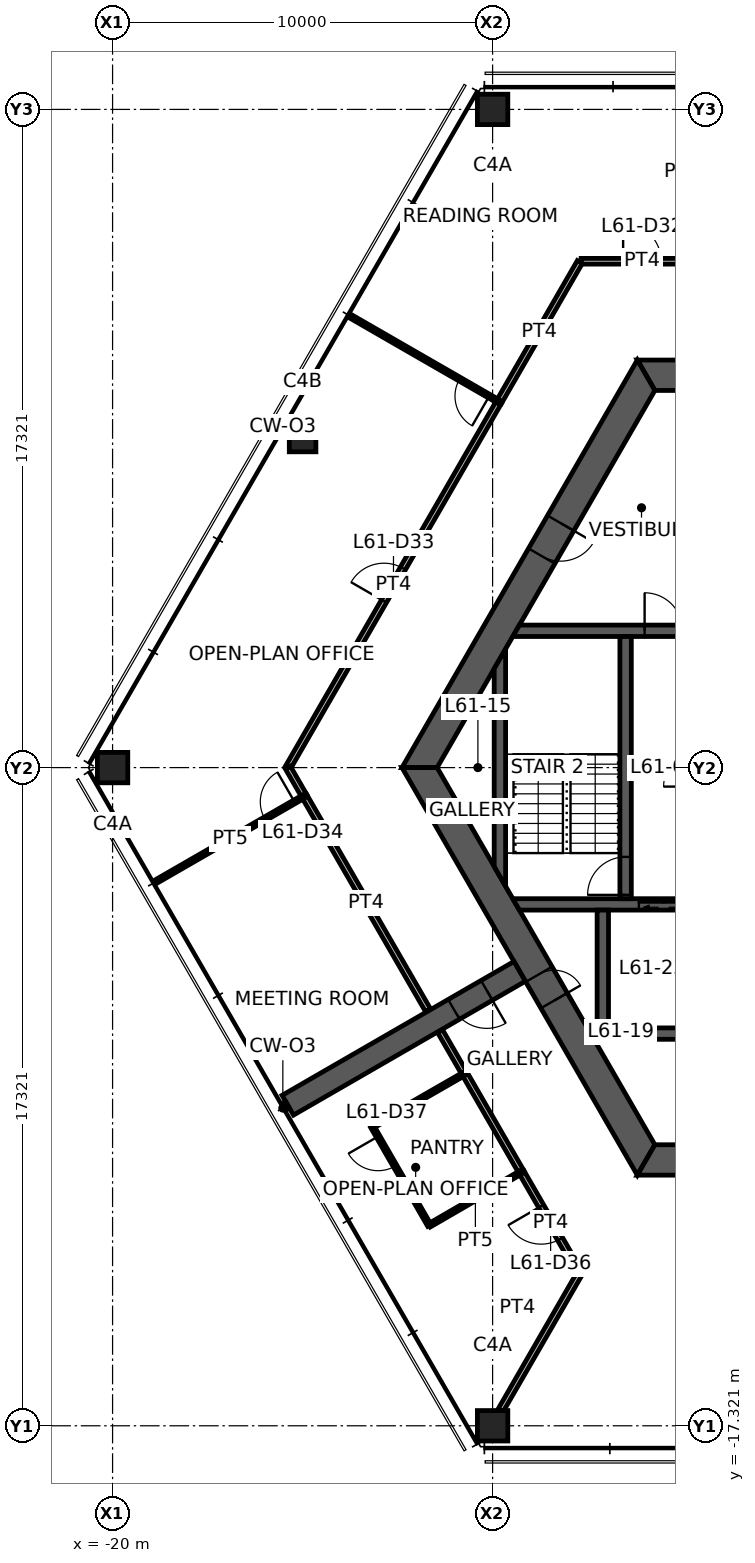
"""IFC4 building model, lengths in metres.
Left out: names, types, materials, properties, quantities, classifications, styles, units other than length and angle.
Written with IfcOpenShell. Run it as: python <this file> out.ifc"""

import sys

from ifc_helpers import new_model, si_unit, direction, frame, frame_2d, origin, origin_2d, place, context, subcontext, project, spatial, polyline, rectangle, hollow_rectangle, outline, extrude, element, fill, save


model = new_model("IFC4")
c1 = context("Model", 3, precision=1e-05, world=origin(), true_north=direction((0.0, 1.0)))
c2 = subcontext(c1, "Body", "Model", "MODEL_VIEW")
j1 = project(units=[si_unit("LENGTHUNIT", "METRE"), si_unit("PLANEANGLEUNIT", "RADIAN")], contexts=[c1])
p1 = place(None, origin())
s1 = spatial("IfcSite", under=j1, at=p1, CompositionType="ELEMENT")
p2 = place(p1, origin())
s2 = spatial("IfcBuilding", under=s1, at=p2, CompositionType="ELEMENT")
p3 = place(p2, frame((0.0, 0.0, 244.0)))
s3 = spatial("IfcBuildingStorey", under=s2, at=p3, CompositionType="ELEMENT", Elevation=244.0)
for number, where, z_axis, x_axis in (
    (1, (-10.0, 17.321, 0.0), (0.0, 0.0, 1.0), (1.0, 0.0, 0.0)),
    (2, (-20.0, 0.0, 0.0), (0.0, 0.0, 1.0), (1.0, 0.0, 0.0)),
    (3, (-10.0, -17.321, 0.0), (0.0, 0.0, 1.0), (1.0, 0.0, 0.0)),
):
    element("IfcColumn", number, at=place(p3, frame(where, z_axis=z_axis, x_axis=x_axis)), inside=s3, PredefinedType="COLUMN", context=c2, shape_type="SweptSolid", body=[
        extrude(hollow_rectangle(XDim=0.8, YDim=0.8, WallThickness=0.04, at=origin_2d()), origin(), (0.0, 0.0, 1.0), 3.9),
    ])
p4 = place(p3, frame((-15.0, 8.66, 0.0), z_axis=(0.0, 0.0, 1.0), x_axis=(1.0, 0.0, 0.0)))
e4 = element("IfcColumn", 4, at=p4, inside=s3, PredefinedType="COLUMN", context=c2, shape_type="SweptSolid", body=[
    extrude(hollow_rectangle(XDim=0.7, YDim=0.7, WallThickness=0.032, at=origin_2d()), origin(), (0.0, 0.0, 1.0), 3.9),
])
p5 = place(p3, frame((5.961, 10.325, 0.0), z_axis=(0.0, 0.0, 1.0), x_axis=(-1.0, 0.0, 0.0)))
e5 = element("IfcWall", 5, at=p5, inside=s3, PredefinedType="SHEAR", context=c2, shape_type="SweptSolid", body=[
    extrude(outline(polyline([(-0.231, -0.4), (4.636, -0.4), (5.536, -0.4), (6.386, -0.4), (7.286, -0.4), (12.153, -0.4), (11.691, 0.4), (7.286, 0.4), (6.386, 0.4), (5.536, 0.4), (4.636, 0.4), (0.231, 0.4), (-0.231, -0.4)])), origin(), (0.0, 0.0, 1.0), 3.9),
])
p6 = place(p5, frame((6.386, 0.0, 0.0)))
e6 = element("IfcOpeningElement", 6, at=p6, cuts=e5, PredefinedType="OPENING", context=c2, shape_type="SweptSolid", body=[
    extrude(rectangle(XDim=0.9, YDim=2.1, at=frame_2d((0.45, 1.05))), frame((0.0, 0.41, 0.0), z_axis=(0.0, -1.0, 0.0), x_axis=(1.0, 0.0, 0.0)), (0.0, 0.0, 1.0), 0.82),
])
p7 = place(p5, frame((4.636, 0.0, 0.0)))
e7 = element("IfcOpeningElement", 7, at=p7, cuts=e5, PredefinedType="OPENING", context=c2, shape_type="SweptSolid", body=[
    extrude(rectangle(XDim=0.9, YDim=2.1, at=frame_2d((0.45, 1.05))), frame((0.0, 0.41, 0.0), z_axis=(0.0, -1.0, 0.0), x_axis=(1.0, 0.0, 0.0)), (0.0, 0.0, 1.0), 0.82),
])
p8 = place(p3, frame((-5.961, 10.325, 0.0), z_axis=(0.0, 0.0, 1.0), x_axis=(-0.500004296715, -0.866022923061, 0.0)))
e8 = element("IfcWall", 8, at=p8, inside=s3, PredefinedType="SHEAR", context=c2, shape_type="SweptSolid", body=[
    extrude(outline(polyline([(-0.231, -0.4), (4.494, -0.4), (5.494, -0.4), (12.153, -0.4), (11.691, 0.4), (5.494, 0.4), (4.494, 0.4), (0.231, 0.4), (-0.231, -0.4)])), origin(), (0.0, 0.0, 1.0), 3.9),
])
p9 = place(p8, frame((4.494, 0.0, 0.0)))
e9 = element("IfcOpeningElement", 9, at=p9, cuts=e8, PredefinedType="OPENING", context=c2, shape_type="SweptSolid", body=[
    extrude(rectangle(XDim=1.0, YDim=2.1, at=frame_2d((0.5, 1.05))), frame((0.0, 0.41, 0.0), z_axis=(0.0, -1.0, 0.0), x_axis=(1.0, 0.0, 0.0)), (0.0, 0.0, 1.0), 0.82),
])
p10 = place(p3, frame((-11.922, 0.0, 0.0), z_axis=(0.0, 0.0, 1.0), x_axis=(0.500004296715, -0.866022923061, 0.0)))
e10 = element("IfcWall", 10, at=p10, inside=s3, PredefinedType="SHEAR", context=c2, shape_type="SweptSolid", body=[
    extrude(outline(polyline([(-0.231, -0.4), (6.281, -0.4), (7.081, -0.4), (12.153, -0.4), (11.691, 0.4), (7.081, 0.4), (6.281, 0.4), (0.231, 0.4), (-0.231, -0.4)])), origin(), (0.0, 0.0, 1.0), 3.9),
])
p11 = place(p10, frame((6.281, 0.0, 0.0)))
e11 = element("IfcOpeningElement", 11, at=p11, cuts=e10, PredefinedType="OPENING", context=c2, shape_type="SweptSolid", body=[
    extrude(rectangle(XDim=0.8, YDim=2.1, at=frame_2d((0.4, 1.05))), frame((0.0, 0.41, 0.0), z_axis=(0.0, -1.0, 0.0), x_axis=(1.0, 0.0, 0.0)), (0.0, 0.0, 1.0), 0.82),
])
p12 = place(p3, frame((-5.961, -10.325, 0.0), z_axis=(0.0, 0.0, 1.0), x_axis=(1.0, 0.0, 0.0)))
e12 = element("IfcWall", 12, at=p12, inside=s3, PredefinedType="SHEAR", context=c2, shape_type="SweptSolid", body=[
    extrude(outline(polyline([(-0.231, -0.4), (5.461, -0.4), (6.461, -0.4), (12.153, -0.4), (11.691, 0.4), (6.461, 0.4), (5.461, 0.4), (0.231, 0.4), (-0.231, -0.4)])), origin(), (0.0, 0.0, 1.0), 3.9),
])
p13 = place(p12, frame((5.461, 0.0, 0.0)))
e13 = element("IfcOpeningElement", 13, at=p13, cuts=e12, PredefinedType="OPENING", context=c2, shape_type="SweptSolid", body=[
    extrude(rectangle(XDim=1.0, YDim=2.1, at=frame_2d((0.5, 1.05))), frame((0.0, 0.41, 0.0), z_axis=(0.0, -1.0, 0.0), x_axis=(1.0, 0.0, 0.0)), (0.0, 0.0, 1.0), 0.82),
])
p14 = place(p3, frame((-9.288, -5.363, 0.0), z_axis=(0.0, 0.0, 1.0), x_axis=(-0.866027473358, -0.499996415376, 0.0)))
e14 = element("IfcWall", 14, at=p14, inside=s3, PredefinedType="SHEAR", context=c2, shape_type="SweptSolid", body=[
    extrude(rectangle(XDim=7.045, YDim=0.6, at=frame_2d((3.523, 0.0))), origin(), (0.0, 0.0, 1.0), 3.9),
])
p15 = place(p14, frame((1.0, 0.0, 0.0)))
e15 = element("IfcOpeningElement", 15, at=p15, cuts=e14, PredefinedType="OPENING", context=c2, shape_type="SweptSolid", body=[
    extrude(rectangle(XDim=1.0, YDim=2.1, at=frame_2d((0.5, 1.05))), frame((0.0, 0.31, 0.0), z_axis=(0.0, -1.0, 0.0), x_axis=(1.0, 0.0, 0.0)), (0.0, 0.0, 1.0), 0.62),
])
p16 = place(p3, frame((-9.382, 3.6, 0.0), z_axis=(0.0, 0.0, 1.0), x_axis=(1.0, 0.0, 0.0)))
e16 = element("IfcWall", 16, at=p16, inside=s3, PredefinedType="SHEAR", context=c2, shape_type="SweptSolid", body=[
    extrude(outline(polyline([(-0.087, -0.15), (3.382, -0.15), (4.382, -0.15), (5.782, -0.15), (6.882, -0.15), (7.932, -0.15), (7.932, 0.15), (6.882, 0.15), (5.782, 0.15), (4.382, 0.15), (3.382, 0.15), (0.087, 0.15), (-0.087, -0.15)])), origin(), (0.0, 0.0, 1.0), 3.9),
])
p17 = place(p16, frame((3.382, 0.0, 0.0)))
e17 = element("IfcOpeningElement", 17, at=p17, cuts=e16, PredefinedType="OPENING", context=c2, shape_type="SweptSolid", body=[
    extrude(rectangle(XDim=1.0, YDim=2.1, at=frame_2d((0.5, 1.05))), frame((0.0, 0.16, 0.0), z_axis=(0.0, -1.0, 0.0), x_axis=(1.0, 0.0, 0.0)), (0.0, 0.0, 1.0), 0.32),
])
p18 = place(p16, frame((5.782, 0.0, 0.0)))
e18 = element("IfcOpeningElement", 18, at=p18, cuts=e16, PredefinedType="OPENING", context=c2, shape_type="SweptSolid", body=[
    extrude(rectangle(XDim=1.1, YDim=2.1, at=frame_2d((0.55, 1.05))), frame((0.0, 0.16, 0.0), z_axis=(0.0, -1.0, 0.0), x_axis=(1.0, 0.0, 0.0)), (0.0, 0.0, 1.0), 0.32),
])
p19 = place(p3, frame((-9.382, -3.6, 0.0), z_axis=(0.0, 0.0, 1.0), x_axis=(1.0, 0.0, 0.0)))
e19 = element("IfcWall", 19, at=p19, inside=s3, PredefinedType="SHEAR", context=c2, shape_type="SweptSolid", body=[
    extrude(outline(polyline([(0.087, -0.15), (3.232, -0.15), (4.532, -0.15), (5.782, -0.15), (6.882, -0.15), (7.932, -0.15), (7.932, 0.15), (6.882, 0.15), (5.782, 0.15), (4.532, 0.15), (3.232, 0.15), (-0.087, 0.15), (0.087, -0.15)])), origin(), (0.0, 0.0, 1.0), 3.9),
])
p20 = place(p19, frame((5.782, 0.0, 0.0)))
e20 = element("IfcOpeningElement", 20, at=p20, cuts=e19, PredefinedType="OPENING", context=c2, shape_type="SweptSolid", body=[
    extrude(rectangle(XDim=1.1, YDim=2.1, at=frame_2d((0.55, 1.05))), frame((0.0, 0.16, 0.0), z_axis=(0.0, -1.0, 0.0), x_axis=(1.0, 0.0, 0.0)), (0.0, 0.0, 1.0), 0.32),
])
p21 = place(p19, frame((3.232, 0.0, 0.0)))
e21 = element("IfcOpeningElement", 21, at=p21, cuts=e19, PredefinedType="OPENING", context=c2, shape_type="SweptSolid", body=[
    extrude(rectangle(XDim=1.3, YDim=2.1, at=frame_2d((0.65, 1.05))), frame((0.0, 0.16, 0.0), z_axis=(0.0, -1.0, 0.0), x_axis=(1.0, 0.0, 0.0)), (0.0, 0.0, 1.0), 0.32),
])
p22 = place(p3, frame((-6.5, -3.45, 0.0), z_axis=(0.0, 0.0, 1.0), x_axis=(0.0, 1.0, 0.0)))
e22 = element("IfcWall", 22, at=p22, inside=s3, PredefinedType="SHEAR", context=c2, shape_type="SweptSolid", body=[
    extrude(rectangle(XDim=6.9, YDim=0.3, at=frame_2d((3.45, 0.0))), origin(), (0.0, 0.0, 1.0), 3.9),
])
p23 = place(p22, frame((0.1, 0.0, 0.0)))
e23 = element("IfcOpeningElement", 23, at=p23, cuts=e22, PredefinedType="OPENING", context=c2, shape_type="SweptSolid", body=[
    extrude(rectangle(XDim=1.0, YDim=2.1, at=frame_2d((0.5, 1.05))), frame((0.0, 0.16, 0.0), z_axis=(0.0, -1.0, 0.0), x_axis=(1.0, 0.0, 0.0)), (0.0, 0.0, 1.0), 0.32),
])
p24 = place(p3, frame((-7.25, -7.0, 0.0), z_axis=(0.0, 0.0, 1.0), x_axis=(1.0, 0.0, 0.0)))
e24 = element("IfcWall", 24, at=p24, inside=s3, PredefinedType="SHEAR", context=c2, shape_type="SweptSolid", body=[
    extrude(rectangle(XDim=2.6, YDim=0.3, at=frame_2d((1.3, 0.0))), origin(), (0.0, 0.0, 1.0), 3.9),
])
p25 = place(p3, frame((-7.1, -3.75, 0.0), z_axis=(0.0, 0.0, 1.0), x_axis=(0.0, -1.0, 0.0)))
e25 = element("IfcWall", 25, at=p25, inside=s3, PredefinedType="SHEAR", context=c2, shape_type="SweptSolid", body=[
    extrude(rectangle(XDim=3.1, YDim=0.3, at=frame_2d((1.55, 0.0))), origin(), (0.0, 0.0, 1.0), 3.9),
])
p26 = place(p3, frame((-9.808, -2.862, 0.0), z_axis=(0.0, 0.0, 1.0), x_axis=(0.0, 1.0, 0.0)))
e26 = element("IfcWall", 26, at=p26, inside=s3, PredefinedType="SHEAR", context=c2, shape_type="SweptSolid", body=[
    extrude(outline(polyline([(-0.26, -0.15), (5.984, -0.15), (5.465, 0.15), (0.26, 0.15), (-0.26, -0.15)])), origin(), (0.0, 0.0, 1.0), 3.9),
])
p27 = place(p3, frame((-7.67, 13.325, 0.0), z_axis=(0.0, 0.0, 1.0), x_axis=(1.0, 0.0, 0.0)))
e27 = element("IfcWall", 27, at=p27, inside=s3, PredefinedType="PARTITIONING", context=c2, shape_type="SweptSolid", body=[
    extrude(rectangle(XDim=3.21, YDim=0.15, at=frame_2d((1.605, 0.0))), origin(), (0.0, 0.0, 1.0), 2.95),
])
p28 = place(p27, frame((1.105, 0.0, 0.0)))
e28 = element("IfcOpeningElement", 28, at=p28, cuts=e27, PredefinedType="OPENING", context=c2, shape_type="SweptSolid", body=[
    extrude(rectangle(XDim=1.0, YDim=2.1, at=frame_2d((0.5, 1.05))), frame((0.0, 0.085, 0.0), z_axis=(0.0, -1.0, 0.0), x_axis=(1.0, 0.0, 0.0)), (0.0, 0.0, 1.0), 0.17),
])
p29 = place(p3, frame((-11.7, -6.385, 0.0), z_axis=(0.0, 0.0, 1.0), x_axis=(-0.500003537243, 0.866023361547, 0.0)))
e29 = element("IfcWall", 29, at=p29, inside=s3, PredefinedType="PARTITIONING", context=c2, shape_type="SweptSolid", body=[
    extrude(rectangle(XDim=6.516, YDim=0.15, at=frame_2d((3.258, 0.0))), origin(), (0.0, 0.0, 1.0), 2.95),
])
p30 = place(p3, frame((-9.835, 9.616, 0.0), z_axis=(0.0, 0.0, 1.0), x_axis=(0.500078009402, 0.86598036035, 0.0)))
e30 = element("IfcWall", 30, at=p30, inside=s3, PredefinedType="PARTITIONING", context=c2, shape_type="SweptSolid", body=[
    extrude(rectangle(XDim=4.26, YDim=0.15, at=frame_2d((2.13, 0.0))), origin(), (0.0, 0.0, 1.0), 2.95),
])
p31 = place(p3, frame((-15.386, 0.0, 0.0), z_axis=(0.0, 0.0, 1.0), x_axis=(0.50000453164, 0.866022787425, 0.0)))
e31 = element("IfcWall", 31, at=p31, inside=s3, PredefinedType="PARTITIONING", context=c2, shape_type="SweptSolid", body=[
    extrude(rectangle(XDim=11.113, YDim=0.15, at=frame_2d((5.557, 0.0))), origin(), (0.0, 0.0, 1.0), 2.95),
])
p32 = place(p31, frame((5.057, 0.0, 0.0)))
e32 = element("IfcOpeningElement", 32, at=p32, cuts=e31, PredefinedType="OPENING", context=c2, shape_type="SweptSolid", body=[
    extrude(rectangle(XDim=1.0, YDim=2.1, at=frame_2d((0.5, 1.05))), frame((0.0, 0.085, 0.0), z_axis=(0.0, -1.0, 0.0), x_axis=(1.0, 0.0, 0.0)), (0.0, 0.0, 1.0), 0.17),
])
p33 = place(p3, frame((-14.953, -0.75, 0.0), z_axis=(0.0, 0.0, 1.0), x_axis=(-0.500258826225, 0.865875918815, 0.0)))
e33 = element("IfcWall", 33, at=p33, inside=s3, PredefinedType="PARTITIONING", context=c2, shape_type="SweptSolid", body=[
    extrude(rectangle(XDim=0.867, YDim=0.15, at=frame_2d((0.433, 0.0))), origin(), (0.0, 0.0, 1.0), 2.95),
])
p34 = place(p3, frame((-18.857, -3.0, 0.0), z_axis=(0.0, 0.0, 1.0), x_axis=(0.866517357236, 0.4991469419, 0.0)))
e34 = element("IfcWall", 34, at=p34, inside=s3, PredefinedType="PARTITIONING", context=c2, shape_type="SweptSolid", body=[
    extrude(rectangle(XDim=4.506, YDim=0.1, at=frame_2d((2.253, 0.0))), origin(), (0.0, 0.0, 1.0), 2.95),
])
p35 = place(p34, frame((3.306, 0.0, 0.0)))
e35 = element("IfcOpeningElement", 35, at=p35, cuts=e34, PredefinedType="OPENING", context=c2, shape_type="SweptSolid", body=[
    extrude(rectangle(XDim=0.9, YDim=2.1, at=frame_2d((0.45, 1.05))), frame((0.0, 0.06, 0.0), z_axis=(0.0, -1.0, 0.0), x_axis=(1.0, 0.0, 0.0)), (0.0, 0.0, 1.0), 0.12),
])
p36 = place(p3, frame((-9.83, 9.624, 0.0), z_axis=(0.0, 0.0, 1.0), x_axis=(-0.866527293697, 0.499129691842, 0.0)))
e36 = element("IfcWall", 36, at=p36, inside=s3, PredefinedType="PARTITIONING", context=c2, shape_type="SweptSolid", body=[
    extrude(rectangle(XDim=4.505, YDim=0.1, at=frame_2d((2.253, 0.0))), origin(), (0.0, 0.0, 1.0), 2.95),
])
p37 = place(p36, frame((0.3, 0.0, 0.0)))
e37 = element("IfcOpeningElement", 37, at=p37, cuts=e36, PredefinedType="OPENING", context=c2, shape_type="SweptSolid", body=[
    extrude(rectangle(XDim=0.9, YDim=2.1, at=frame_2d((0.45, 1.05))), frame((0.0, 0.06, 0.0), z_axis=(0.0, -1.0, 0.0), x_axis=(1.0, 0.0, 0.0)), (0.0, 0.0, 1.0), 0.12),
])
p38 = place(p3, frame((-9.237, -10.65, 0.0), z_axis=(0.0, 0.0, 1.0), x_axis=(-0.499977562641, 0.866038357612, 0.0)))
e38 = element("IfcWall", 38, at=p38, inside=s3, PredefinedType="PARTITIONING", context=c2, shape_type="SweptSolid", body=[
    extrude(rectangle(XDim=3.01, YDim=0.15, at=frame_2d((1.505, 0.0))), origin(), (0.0, 0.0, 1.0), 2.95),
])
p39 = place(p3, frame((-10.738, -8.052, 0.0), z_axis=(0.0, 0.0, 1.0), x_axis=(-0.500084415177, 0.865976661173, 0.0)))
e39 = element("IfcWall", 39, at=p39, inside=s3, PredefinedType="PARTITIONING", context=c2, shape_type="SweptSolid", body=[
    extrude(rectangle(XDim=1.284, YDim=0.15, at=frame_2d((0.642, 0.0))), origin(), (0.0, 0.0, 1.0), 2.95),
])
p40 = place(p3, frame((-7.705, -13.305, 0.0), z_axis=(0.0, 0.0, 1.0), x_axis=(-0.500024891708, 0.866011032073, 0.0)))
e40 = element("IfcWall", 40, at=p40, inside=s3, PredefinedType="PARTITIONING", context=c2, shape_type="SweptSolid", body=[
    extrude(rectangle(XDim=3.074, YDim=0.15, at=frame_2d((1.537, 0.0))), origin(), (0.0, 0.0, 1.0), 2.95),
])
p41 = place(p40, frame((1.037, 0.0, 0.0)))
e41 = element("IfcOpeningElement", 41, at=p41, cuts=e40, PredefinedType="OPENING", context=c2, shape_type="SweptSolid", body=[
    extrude(rectangle(XDim=1.0, YDim=2.1, at=frame_2d((0.5, 1.05))), frame((0.0, 0.085, 0.0), z_axis=(0.0, -1.0, 0.0), x_axis=(1.0, 0.0, 0.0)), (0.0, 0.0, 1.0), 0.17),
])
p42 = place(p3, frame((-13.165, -9.448, 0.0), z_axis=(0.0, 0.0, 1.0), x_axis=(0.866855433567, 0.498559582492, 0.0)))
e42 = element("IfcWall", 42, at=p42, inside=s3, PredefinedType="PARTITIONING", context=c2, shape_type="SweptSolid", body=[
    extrude(rectangle(XDim=2.8, YDim=0.1, at=frame_2d((1.4, 0.0))), origin(), (0.0, 0.0, 1.0), 2.95),
])
p43 = place(p3, frame((-11.665, -12.046, 0.0), z_axis=(0.0, 0.0, 1.0), x_axis=(-0.499990139034, 0.866031096941, 0.0)))
e43 = element("IfcWall", 43, at=p43, inside=s3, PredefinedType="PARTITIONING", context=c2, shape_type="SweptSolid", body=[
    extrude(rectangle(XDim=3.0, YDim=0.1, at=frame_2d((1.5, 0.0))), origin(), (0.0, 0.0, 1.0), 2.95),
])
p44 = place(p43, frame((1.8, 0.0, 0.0)))
e44 = element("IfcOpeningElement", 44, at=p44, cuts=e43, PredefinedType="OPENING", context=c2, shape_type="SweptSolid", body=[
    extrude(rectangle(XDim=0.9, YDim=2.1, at=frame_2d((0.45, 1.05))), frame((0.0, 0.06, 0.0), z_axis=(0.0, -1.0, 0.0), x_axis=(1.0, 0.0, 0.0)), (0.0, 0.0, 1.0), 0.12),
])
p45 = place(p3, frame((-9.242, -10.642, 0.0), z_axis=(0.0, 0.0, 1.0), x_axis=(-0.865255114713, -0.501331812737, 0.0)))
e45 = element("IfcWall", 45, at=p45, inside=s3, PredefinedType="PARTITIONING", context=c2, shape_type="SweptSolid", body=[
    extrude(rectangle(XDim=2.8, YDim=0.1, at=frame_2d((1.4, 0.0))), origin(), (0.0, 0.0, 1.0), 2.95),
])
p46 = place(p3, frame((-7.705, -13.305, 0.0), z_axis=(0.0, 0.0, 1.0), x_axis=(-0.500036655653, -0.866004239599, 0.0)))
e46 = element("IfcWall", 46, at=p46, inside=s3, PredefinedType="PARTITIONING", context=c2, shape_type="SweptSolid", body=[
    extrude(rectangle(XDim=4.17, YDim=0.15, at=frame_2d((2.085, 0.0))), origin(), (0.0, 0.0, 1.0), 2.95),
])
p47 = place(p3, frame((-15.39, -8.885, 0.0), z_axis=(0.0, 0.0, 1.0), x_axis=(-0.866472036435, -0.499225610396, 0.0)))
e47 = element("IfcWall", 47, at=p47, inside=s3, PredefinedType="PARTITIONING", context=c2, shape_type="SweptSolid", body=[
    extrude(rectangle(XDim=0.085, YDim=0.175, at=frame_2d((0.042, 0.0))), origin(), (0.0, 0.0, 1.0), 3.9),
])
p48 = place(p11, origin())
e48 = element("IfcDoor", 48, at=p48, inside=s3, OperationType="SINGLE_SWING_RIGHT", PredefinedType="DOOR", context=c2, shape_type="SweptSolid", body=[
    extrude(rectangle(XDim=0.8, YDim=2.1, at=frame_2d((0.4, 1.05))), frame((0.0, 0.025, 0.0), z_axis=(0.0, -1.0, 0.0), x_axis=(1.0, 0.0, 0.0)), (0.0, 0.0, 1.0), 0.05),
])
fill(e11, e48)
p49 = place(p9, origin())
e49 = element("IfcDoor", 49, at=p49, inside=s3, OperationType="SINGLE_SWING_LEFT", PredefinedType="DOOR", context=c2, shape_type="SweptSolid", body=[
    extrude(rectangle(XDim=1.0, YDim=2.1, at=frame_2d((0.5, 1.05))), frame((0.0, 0.025, 0.0), z_axis=(0.0, -1.0, 0.0), x_axis=(1.0, 0.0, 0.0)), (0.0, 0.0, 1.0), 0.05),
])
fill(e9, e49)
p50 = place(p23, origin())
e50 = element("IfcDoor", 50, at=p50, inside=s3, OperationType="SINGLE_SWING_LEFT", PredefinedType="DOOR", context=c2, shape_type="SweptSolid", body=[
    extrude(rectangle(XDim=1.0, YDim=2.1, at=frame_2d((0.5, 1.05))), frame((0.0, 0.025, 0.0), z_axis=(0.0, -1.0, 0.0), x_axis=(1.0, 0.0, 0.0)), (0.0, 0.0, 1.0), 0.05),
])
fill(e23, e50)
p51 = place(p17, origin())
e51 = element("IfcDoor", 51, at=p51, inside=s3, OperationType="SINGLE_SWING_LEFT", PredefinedType="DOOR", context=c2, shape_type="SweptSolid", body=[
    extrude(rectangle(XDim=1.0, YDim=2.1, at=frame_2d((0.5, 1.05))), frame((0.0, 0.025, 0.0), z_axis=(0.0, -1.0, 0.0), x_axis=(1.0, 0.0, 0.0)), (0.0, 0.0, 1.0), 0.05),
])
fill(e17, e51)
p52 = place(p15, origin())
e52 = element("IfcDoor", 52, at=p52, inside=s3, OperationType="SINGLE_SWING_LEFT", PredefinedType="DOOR", context=c2, shape_type="SweptSolid", body=[
    extrude(rectangle(XDim=1.0, YDim=2.1, at=frame_2d((0.5, 1.05))), frame((0.0, 0.025, 0.0), z_axis=(0.0, -1.0, 0.0), x_axis=(1.0, 0.0, 0.0)), (0.0, 0.0, 1.0), 0.05),
])
fill(e15, e52)
p53 = place(p28, origin())
e53 = element("IfcDoor", 53, at=p53, inside=s3, OperationType="SINGLE_SWING_LEFT", PredefinedType="DOOR", context=c2, shape_type="SweptSolid", body=[
    extrude(rectangle(XDim=1.0, YDim=2.1, at=frame_2d((0.5, 1.05))), frame((0.0, 0.025, 0.0), z_axis=(0.0, -1.0, 0.0), x_axis=(1.0, 0.0, 0.0)), (0.0, 0.0, 1.0), 0.05),
])
fill(e28, e53)
p54 = place(p32, origin())
e54 = element("IfcDoor", 54, at=p54, inside=s3, OperationType="SINGLE_SWING_LEFT", PredefinedType="DOOR", context=c2, shape_type="SweptSolid", body=[
    extrude(rectangle(XDim=1.0, YDim=2.1, at=frame_2d((0.5, 1.05))), frame((0.0, 0.025, 0.0), z_axis=(0.0, -1.0, 0.0), x_axis=(1.0, 0.0, 0.0)), (0.0, 0.0, 1.0), 0.05),
])
fill(e32, e54)
p55 = place(p35, origin())
e55 = element("IfcDoor", 55, at=p55, inside=s3, OperationType="SINGLE_SWING_RIGHT", PredefinedType="DOOR", context=c2, shape_type="SweptSolid", body=[
    extrude(rectangle(XDim=0.9, YDim=2.1, at=frame_2d((0.45, 1.05))), frame((0.0, 0.025, 0.0), z_axis=(0.0, -1.0, 0.0), x_axis=(1.0, 0.0, 0.0)), (0.0, 0.0, 1.0), 0.05),
])
fill(e35, e55)
p56 = place(p37, origin())
e56 = element("IfcDoor", 56, at=p56, inside=s3, OperationType="SINGLE_SWING_LEFT", PredefinedType="DOOR", context=c2, shape_type="SweptSolid", body=[
    extrude(rectangle(XDim=0.9, YDim=2.1, at=frame_2d((0.45, 1.05))), frame((0.0, 0.025, 0.0), z_axis=(0.0, -1.0, 0.0), x_axis=(1.0, 0.0, 0.0)), (0.0, 0.0, 1.0), 0.05),
])
fill(e37, e56)
p57 = place(p41, origin())
e57 = element("IfcDoor", 57, at=p57, inside=s3, OperationType="SINGLE_SWING_RIGHT", PredefinedType="DOOR", context=c2, shape_type="SweptSolid", body=[
    extrude(rectangle(XDim=1.0, YDim=2.1, at=frame_2d((0.5, 1.05))), frame((0.0, 0.025, 0.0), z_axis=(0.0, -1.0, 0.0), x_axis=(1.0, 0.0, 0.0)), (0.0, 0.0, 1.0), 0.05),
])
fill(e41, e57)
p58 = place(p44, origin())
e58 = element("IfcDoor", 58, at=p58, inside=s3, OperationType="SINGLE_SWING_RIGHT", PredefinedType="DOOR", context=c2, shape_type="SweptSolid", body=[
    extrude(rectangle(XDim=0.9, YDim=2.1, at=frame_2d((0.45, 1.05))), frame((0.0, 0.025, 0.0), z_axis=(0.0, -1.0, 0.0), x_axis=(1.0, 0.0, 0.0)), (0.0, 0.0, 1.0), 0.05),
])
fill(e44, e58)
p59 = place(p21, origin())
e59 = element("IfcDoor", 59, at=p59, inside=s3, OperationType="DOUBLE_DOOR_SLIDING", PredefinedType="DOOR", context=c2, shape_type="SweptSolid", body=[
    extrude(rectangle(XDim=1.3, YDim=2.1, at=frame_2d((0.65, 1.05))), frame((0.0, 0.025, 0.0), z_axis=(0.0, -1.0, 0.0), x_axis=(1.0, 0.0, 0.0)), (0.0, 0.0, 1.0), 0.05),
])
fill(e21, e59)
save(model, sys.argv[1])
